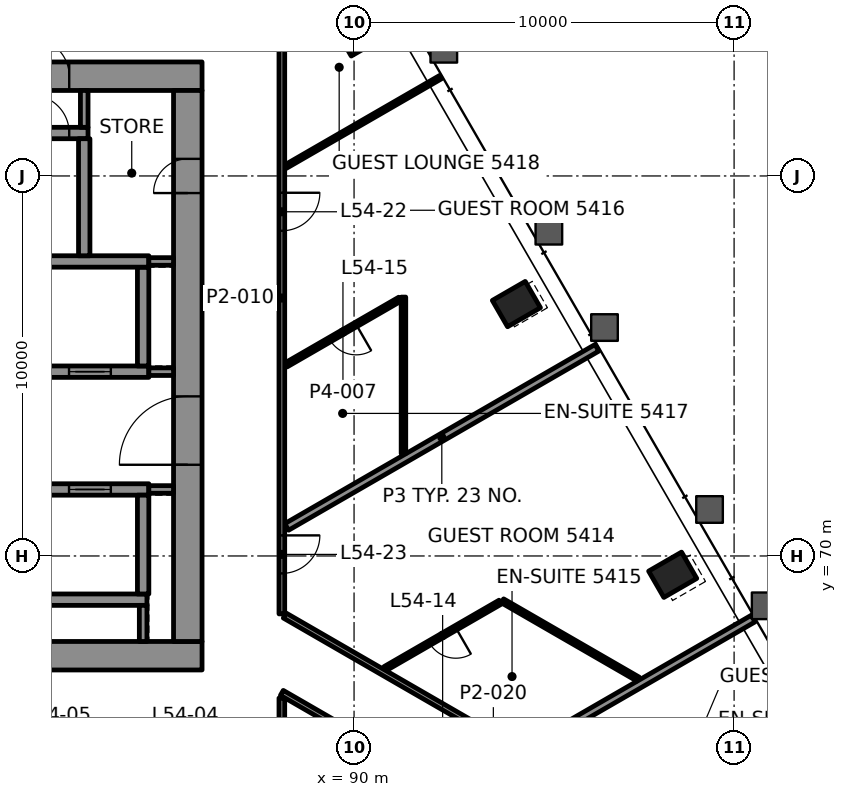
"""IFC4 building model, lengths in metres.
Left out: names, types, materials, properties, quantities, classifications, styles, units other than length and angle.
Written with IfcOpenShell. Run it as: python <this file> out.ifc"""

import sys

from ifc_helpers import new_model, si_unit, direction, frame, frame_2d, origin, origin_2d, place, context, subcontext, project, spatial, rectangle, hollow_rectangle, extrude, element, fill, save


model = new_model("IFC4")
c1 = context("Model", 3, precision=1e-05, world=origin(), true_north=direction((0.0, 1.0)))
c2 = subcontext(c1, "Body", "Model", "MODEL_VIEW")
j1 = project(units=[si_unit("LENGTHUNIT", "METRE"), si_unit("PLANEANGLEUNIT", "RADIAN")], contexts=[c1])
p1 = place(None, origin())
s1 = spatial("IfcSite", under=j1, at=p1, CompositionType="ELEMENT")
p2 = place(p1, origin())
s2 = spatial("IfcBuilding", under=s1, at=p2, CompositionType="ELEMENT")
p3 = place(p2, frame((0.0, 0.0, 229.9)))
s3 = spatial("IfcBuildingStorey", under=s2, at=p3, CompositionType="ELEMENT", Elevation=229.9)
for number, where, z_axis, x_axis in (
    (1, (98.385, 69.505, -0.0), (0.0, 0.0, 1.0), (-0.5, 0.866, 0.0)),
    (2, (94.272, 76.628, -0.0), (0.0, 0.0, 1.0), (-0.5, 0.866, 0.0)),
    (3, (90.159, 83.752, -0.0), (0.0, 0.0, 1.0), (-0.5, 0.866, 0.0)),
):
    element("IfcColumn", number, at=place(p3, frame(where, z_axis=z_axis, x_axis=x_axis)), inside=s3, PredefinedType="COLUMN", context=c2, shape_type="SweptSolid", body=[
        extrude(hollow_rectangle(XDim=0.8, YDim=1.0, WallThickness=0.05, at=origin_2d()), origin(), (0.0, 0.0, 1.0), 3.9),
    ])
p4 = place(p3, frame((64.0, 67.375, 0.0), z_axis=(0.0, 0.0, 1.0), x_axis=(1.0, 0.0, 0.0)))
e4 = element("IfcWall", 4, at=p4, inside=s3, PredefinedType="SHEAR", context=c2, shape_type="SweptSolid", body=[
    extrude(rectangle(XDim=22.0, YDim=0.75, at=frame_2d((11.0, 0.0))), origin(), (0.0, 0.0, 1.0), 3.7),
])
p5 = place(p4, frame((1.575, 0.0, 0.0)))
e5 = element("IfcOpeningElement", 5, at=p5, cuts=e4, PredefinedType="OPENING", context=c2, shape_type="SweptSolid", body=[
    extrude(rectangle(XDim=0.9, YDim=2.1, at=frame_2d((0.45, 1.05))), frame((0.0, 0.385, 0.0), z_axis=(0.0, -1.0, 0.0), x_axis=(1.0, 0.0, 0.0)), (0.0, 0.0, 1.0), 0.77),
])
p6 = place(p4, frame((4.425, 0.0, 0.0)))
e6 = element("IfcOpeningElement", 6, at=p6, cuts=e4, PredefinedType="OPENING", context=c2, shape_type="SweptSolid", body=[
    extrude(rectangle(XDim=0.9, YDim=2.1, at=frame_2d((0.45, 1.05))), frame((0.0, 0.385, 0.0), z_axis=(0.0, -1.0, 0.0), x_axis=(1.0, 0.0, 0.0)), (0.0, 0.0, 1.0), 0.77),
])
p7 = place(p3, frame((64.0, 82.625, 0.0), z_axis=(0.0, 0.0, 1.0), x_axis=(1.0, 0.0, 0.0)))
e7 = element("IfcWall", 7, at=p7, inside=s3, PredefinedType="SHEAR", context=c2, shape_type="SweptSolid", body=[
    extrude(rectangle(XDim=22.0, YDim=0.75, at=frame_2d((11.0, 0.0))), origin(), (0.0, 0.0, 1.0), 3.7),
])
p8 = place(p7, frame((3.695, 0.0, 0.0)))
e8 = element("IfcOpeningElement", 8, at=p8, cuts=e7, PredefinedType="OPENING", context=c2, shape_type="SweptSolid", body=[
    extrude(rectangle(XDim=1.0, YDim=2.1, at=frame_2d((0.5, 1.05))), frame((0.0, 0.385, 0.0), z_axis=(0.0, -1.0, 0.0), x_axis=(1.0, 0.0, 0.0)), (0.0, 0.0, 1.0), 0.77),
])
p9 = place(p7, frame((17.505, 0.0, 0.0)))
e9 = element("IfcOpeningElement", 9, at=p9, cuts=e7, PredefinedType="OPENING", context=c2, shape_type="SweptSolid", body=[
    extrude(rectangle(XDim=1.0, YDim=2.1, at=frame_2d((0.5, 1.05))), frame((0.0, 0.385, 0.0), z_axis=(0.0, -1.0, 0.0), x_axis=(1.0, 0.0, 0.0)), (0.0, 0.0, 1.0), 0.77),
])
p10 = place(p7, frame((10.65, 0.0, 0.0)))
e10 = element("IfcOpeningElement", 10, at=p10, cuts=e7, PredefinedType="OPENING", context=c2, shape_type="SweptSolid", body=[
    extrude(rectangle(XDim=0.9, YDim=2.1, at=frame_2d((0.45, 1.05))), frame((0.0, 0.385, 0.0), z_axis=(0.0, -1.0, 0.0), x_axis=(1.0, 0.0, 0.0)), (0.0, 0.0, 1.0), 0.77),
])
p11 = place(p3, frame((85.625, 67.75, 0.0), z_axis=(0.0, 0.0, 1.0), x_axis=(0.0, 1.0, 0.0)))
e11 = element("IfcWall", 11, at=p11, inside=s3, PredefinedType="SHEAR", context=c2, shape_type="SweptSolid", body=[
    extrude(rectangle(XDim=14.5, YDim=0.75, at=frame_2d((7.25, 0.0))), origin(), (0.0, 0.0, 1.0), 3.7),
])
p12 = place(p11, frame((4.65, 0.0, 0.0)))
e12 = element("IfcOpeningElement", 12, at=p12, cuts=e11, PredefinedType="OPENING", context=c2, shape_type="SweptSolid", body=[
    extrude(rectangle(XDim=1.8, YDim=2.1, at=frame_2d((0.9, 1.05))), frame((0.0, 0.385, 0.0), z_axis=(0.0, -1.0, 0.0), x_axis=(1.0, 0.0, 0.0)), (0.0, 0.0, 1.0), 0.77),
])
p13 = place(p11, frame((11.8, 0.0, 0.0)))
e13 = element("IfcOpeningElement", 13, at=p13, cuts=e11, PredefinedType="OPENING", context=c2, shape_type="SweptSolid", body=[
    extrude(rectangle(XDim=0.9, YDim=2.1, at=frame_2d((0.45, 1.05))), frame((0.0, 0.385, 0.0), z_axis=(0.0, -1.0, 0.0), x_axis=(1.0, 0.0, 0.0)), (0.0, 0.0, 1.0), 0.77),
])
p14 = place(p3, frame((70.35, 68.85, 0.0), z_axis=(0.0, 0.0, 1.0), x_axis=(1.0, 0.0, 0.0)))
e14 = element("IfcWall", 14, at=p14, inside=s3, PredefinedType="SHEAR", context=c2, shape_type="SweptSolid", body=[
    extrude(rectangle(XDim=14.2, YDim=0.3, at=frame_2d((7.1, 0.0))), origin(), (0.0, 0.0, 1.0), 3.7),
])
p15 = place(p3, frame((70.3, 71.75, 0.0), z_axis=(0.0, 0.0, 1.0), x_axis=(1.0, 0.0, 0.0)))
e15 = element("IfcWall", 15, at=p15, inside=s3, PredefinedType="SHEAR", context=c2, shape_type="SweptSolid", body=[
    extrude(rectangle(XDim=14.3, YDim=0.3, at=frame_2d((7.15, 0.0))), origin(), (0.0, 0.0, 1.0), 3.7),
])
p16 = place(p15, frame((1.0, 0.0, 0.0)))
e16 = element("IfcOpeningElement", 16, at=p16, cuts=e15, PredefinedType="OPENING", context=c2, shape_type="SweptSolid", body=[
    extrude(rectangle(XDim=1.1, YDim=2.1, at=frame_2d((0.55, 1.05))), frame((0.0, 0.16, 0.0), z_axis=(0.0, -1.0, 0.0), x_axis=(1.0, 0.0, 0.0)), (0.0, 0.0, 1.0), 0.32),
])
p17 = place(p15, frame((3.8, 0.0, 0.0)))
e17 = element("IfcOpeningElement", 17, at=p17, cuts=e15, PredefinedType="OPENING", context=c2, shape_type="SweptSolid", body=[
    extrude(rectangle(XDim=1.1, YDim=2.1, at=frame_2d((0.55, 1.05))), frame((0.0, 0.16, 0.0), z_axis=(0.0, -1.0, 0.0), x_axis=(1.0, 0.0, 0.0)), (0.0, 0.0, 1.0), 0.32),
])
p18 = place(p15, frame((6.6, 0.0, 0.0)))
e18 = element("IfcOpeningElement", 18, at=p18, cuts=e15, PredefinedType="OPENING", context=c2, shape_type="SweptSolid", body=[
    extrude(rectangle(XDim=1.1, YDim=2.1, at=frame_2d((0.55, 1.05))), frame((0.0, 0.16, 0.0), z_axis=(0.0, -1.0, 0.0), x_axis=(1.0, 0.0, 0.0)), (0.0, 0.0, 1.0), 0.32),
])
p19 = place(p15, frame((9.4, 0.0, 0.0)))
e19 = element("IfcOpeningElement", 19, at=p19, cuts=e15, PredefinedType="OPENING", context=c2, shape_type="SweptSolid", body=[
    extrude(rectangle(XDim=1.1, YDim=2.1, at=frame_2d((0.55, 1.05))), frame((0.0, 0.16, 0.0), z_axis=(0.0, -1.0, 0.0), x_axis=(1.0, 0.0, 0.0)), (0.0, 0.0, 1.0), 0.32),
])
p20 = place(p15, frame((12.2, 0.0, 0.0)))
e20 = element("IfcOpeningElement", 20, at=p20, cuts=e15, PredefinedType="OPENING", context=c2, shape_type="SweptSolid", body=[
    extrude(rectangle(XDim=1.1, YDim=2.1, at=frame_2d((0.55, 1.05))), frame((0.0, 0.16, 0.0), z_axis=(0.0, -1.0, 0.0), x_axis=(1.0, 0.0, 0.0)), (0.0, 0.0, 1.0), 0.32),
])
p21 = place(p3, frame((70.3, 74.85, 0.0), z_axis=(0.0, 0.0, 1.0), x_axis=(1.0, 0.0, 0.0)))
e21 = element("IfcWall", 21, at=p21, inside=s3, PredefinedType="SHEAR", context=c2, shape_type="SweptSolid", body=[
    extrude(rectangle(XDim=14.3, YDim=0.3, at=frame_2d((7.15, 0.0))), origin(), (0.0, 0.0, 1.0), 3.7),
])
p22 = place(p21, frame((3.8, 0.0, 0.0)))
e22 = element("IfcOpeningElement", 22, at=p22, cuts=e21, PredefinedType="OPENING", context=c2, shape_type="SweptSolid", body=[
    extrude(rectangle(XDim=1.1, YDim=2.1, at=frame_2d((0.55, 1.05))), frame((0.0, 0.16, 0.0), z_axis=(0.0, -1.0, 0.0), x_axis=(1.0, 0.0, 0.0)), (0.0, 0.0, 1.0), 0.32),
])
p23 = place(p21, frame((12.2, 0.0, 0.0)))
e23 = element("IfcOpeningElement", 23, at=p23, cuts=e21, PredefinedType="OPENING", context=c2, shape_type="SweptSolid", body=[
    extrude(rectangle(XDim=1.1, YDim=2.1, at=frame_2d((0.55, 1.05))), frame((0.0, 0.16, 0.0), z_axis=(0.0, -1.0, 0.0), x_axis=(1.0, 0.0, 0.0)), (0.0, 0.0, 1.0), 0.32),
])
for number, where, z_axis, x_axis in (
    (24, (84.45, 69.0, 0.0), (0.0, 0.0, 1.0), (0.0, 1.0, 0.0)),
    (25, (84.45, 75.0, 0.0), (0.0, 0.0, 1.0), (0.0, 1.0, 0.0)),
):
    element("IfcWall", number, at=place(p3, frame(where, z_axis=z_axis, x_axis=x_axis)), inside=s3, PredefinedType="SHEAR", context=c2, shape_type="SweptSolid", body=[
        extrude(rectangle(XDim=2.6, YDim=0.3, at=frame_2d((1.3, 0.0))), origin(), (0.0, 0.0, 1.0), 3.7),
    ])
p24 = place(p3, frame((67.15, 77.75, 0.0), z_axis=(0.0, 0.0, 1.0), x_axis=(1.0, 0.0, 0.0)))
e26 = element("IfcWall", 26, at=p24, inside=s3, PredefinedType="SHEAR", context=c2, shape_type="SweptSolid", body=[
    extrude(rectangle(XDim=17.45, YDim=0.3, at=frame_2d((8.725, 0.0))), origin(), (0.0, 0.0, 1.0), 3.7),
])
p25 = place(p24, frame((0.545, 0.0, 0.0)))
e27 = element("IfcOpeningElement", 27, at=p25, cuts=e26, PredefinedType="OPENING", context=c2, shape_type="SweptSolid", body=[
    extrude(rectangle(XDim=1.0, YDim=2.1, at=frame_2d((0.5, 1.05))), frame((0.0, 0.16, 0.0), z_axis=(0.0, -1.0, 0.0), x_axis=(1.0, 0.0, 0.0)), (0.0, 0.0, 1.0), 0.32),
])
p26 = place(p3, frame((76.14, 81.13, 0.0), z_axis=(0.0, 0.0, 1.0), x_axis=(1.0, 0.0, 0.0)))
e28 = element("IfcWall", 28, at=p26, inside=s3, PredefinedType="SHEAR", context=c2, shape_type="SweptSolid", body=[
    extrude(rectangle(XDim=6.86, YDim=0.3, at=frame_2d((3.43, 0.0))), origin(), (0.0, 0.0, 1.0), 3.7),
])
p27 = place(p26, frame((5.365, 0.0, 0.0)))
e29 = element("IfcOpeningElement", 29, at=p27, cuts=e28, PredefinedType="OPENING", context=c2, shape_type="SweptSolid", body=[
    extrude(rectangle(XDim=1.0, YDim=2.1, at=frame_2d((0.5, 1.05))), frame((0.0, 0.16, 0.0), z_axis=(0.0, -1.0, 0.0), x_axis=(1.0, 0.0, 0.0)), (0.0, 0.0, 1.0), 0.32),
])
p28 = place(p3, frame((82.9, 77.9, 0.0), z_axis=(0.0, 0.0, 1.0), x_axis=(0.0, 1.0, 0.0)))
e30 = element("IfcWall", 30, at=p28, inside=s3, PredefinedType="SHEAR", context=c2, shape_type="SweptSolid", body=[
    extrude(rectangle(XDim=3.08, YDim=0.3, at=frame_2d((1.54, 0.0))), origin(), (0.0, 0.0, 1.0), 3.7),
])
p29 = place(p3, frame((94.535, 64.907, 0.0), z_axis=(0.0, 0.0, 1.0), x_axis=(0.866022205013, 0.500005540394, 0.0)))
e31 = element("IfcWall", 31, at=p29, inside=s3, PredefinedType="PARTITIONING", context=c2, shape_type="SweptSolid", body=[
    extrude(rectangle(XDim=6.893, YDim=0.2, at=frame_2d((3.447, 0.0))), origin(), (0.0, 0.0, 1.0), 3.1),
])
p30 = place(p3, frame((93.846, 68.784, 0.0), z_axis=(0.0, 0.0, 1.0), x_axis=(-0.865997352085, -0.500048583822, 0.0)))
e32 = element("IfcWall", 32, at=p30, inside=s3, PredefinedType="PARTITIONING", context=c2, shape_type="SweptSolid", body=[
    extrude(rectangle(XDim=3.499, YDim=0.12, at=frame_2d((1.75, 0.0))), origin(), (0.0, 0.0, 1.0), 3.1),
])
p31 = place(p30, frame((1.35, 0.0, 0.0)))
e33 = element("IfcOpeningElement", 33, at=p31, cuts=e32, PredefinedType="OPENING", context=c2, shape_type="SweptSolid", body=[
    extrude(rectangle(XDim=0.8, YDim=2.1, at=frame_2d((0.4, 1.05))), frame((0.0, 0.07, 0.0), z_axis=(0.0, -1.0, 0.0), x_axis=(1.0, 0.0, 0.0)), (0.0, 0.0, 1.0), 0.14),
])
p32 = place(p3, frame((88.227, 70.764, 0.0), z_axis=(0.0, 0.0, 1.0), x_axis=(0.866032053748, 0.499988481748, 0.0)))
e34 = element("IfcWall", 34, at=p32, inside=s3, PredefinedType="PARTITIONING", context=c2, shape_type="SweptSolid", body=[
    extrude(rectangle(XDim=9.427, YDim=0.2, at=frame_2d((4.713, 0.0))), origin(), (0.0, 0.0, 1.0), 3.022),
])
p33 = place(p3, frame((91.206, 76.757, 0.0), z_axis=(0.0, 0.0, 1.0), x_axis=(-0.866028087245, -0.499995352082, 0.0)))
e35 = element("IfcWall", 35, at=p33, inside=s3, PredefinedType="PARTITIONING", context=c2, shape_type="SweptSolid", body=[
    extrude(rectangle(XDim=3.459, YDim=0.12, at=frame_2d((1.729, 0.0))), origin(), (0.0, 0.0, 1.0), 3.1),
])
p34 = place(p33, frame((1.33, 0.0, 0.0)))
e36 = element("IfcOpeningElement", 36, at=p34, cuts=e35, PredefinedType="OPENING", context=c2, shape_type="SweptSolid", body=[
    extrude(rectangle(XDim=0.8, YDim=2.1, at=frame_2d((0.4, 1.05))), frame((0.0, 0.07, 0.0), z_axis=(0.0, -1.0, 0.0), x_axis=(1.0, 0.0, 0.0)), (0.0, 0.0, 1.0), 0.14),
])
p35 = place(p3, frame((88.201, 80.248, 0.0), z_axis=(0.0, 0.0, 1.0), x_axis=(0.866032742664, 0.499987288472, 0.0)))
e37 = element("IfcWall", 37, at=p35, inside=s3, PredefinedType="PARTITIONING", context=c2, shape_type="SweptSolid", body=[
    extrude(rectangle(XDim=4.708, YDim=0.1, at=frame_2d((2.354, 0.0))), origin(), (0.0, 0.0, 1.0), 3.022),
])
p36 = place(p3, frame((91.3, 72.694, 0.0), z_axis=(0.0, 0.0, 1.0), x_axis=(0.0, 1.0, 0.0)))
e38 = element("IfcWall", 38, at=p36, inside=s3, PredefinedType="PARTITIONING", context=c2, shape_type="SweptSolid", body=[
    extrude(rectangle(XDim=4.118, YDim=0.12, at=frame_2d((2.059, 0.0))), origin(), (0.0, 0.0, 1.0), 3.1),
])
p37 = place(p3, frame((88.1, 64.976, 0.0), z_axis=(0.0, 0.0, 1.0), x_axis=(0.0, 1.0, 0.0)))
e39 = element("IfcWall", 39, at=p37, inside=s3, PredefinedType="PARTITIONING", context=c2, shape_type="SweptSolid", body=[
    extrude(rectangle(XDim=1.285, YDim=0.15, at=frame_2d((0.643, 0.0))), origin(), (0.0, 0.0, 1.0), 2.947),
])
p38 = place(p3, frame((88.1, 85.1, 0.0), z_axis=(0.0, 0.0, 1.0), x_axis=(0.0, -1.0, 0.0)))
e40 = element("IfcWall", 40, at=p38, inside=s3, PredefinedType="PARTITIONING", context=c2, shape_type="SweptSolid", body=[
    extrude(rectangle(XDim=16.624, YDim=0.15, at=frame_2d((8.312, 0.0))), origin(), (0.0, 0.0, 1.0), 3.1),
])
p39 = place(p38, frame((5.542, 0.0, 0.0)))
e41 = element("IfcOpeningElement", 41, at=p39, cuts=e40, PredefinedType="OPENING", context=c2, shape_type="SweptSolid", body=[
    extrude(rectangle(XDim=1.0, YDim=2.1, at=frame_2d((0.5, 1.05))), frame((0.0, 0.085, 0.0), z_axis=(0.0, -1.0, 0.0), x_axis=(1.0, 0.0, 0.0)), (0.0, 0.0, 1.0), 0.17),
])
p40 = place(p38, frame((14.558, 0.0, 0.0)))
e42 = element("IfcOpeningElement", 42, at=p40, cuts=e40, PredefinedType="OPENING", context=c2, shape_type="SweptSolid", body=[
    extrude(rectangle(XDim=1.0, YDim=2.1, at=frame_2d((0.5, 1.05))), frame((0.0, 0.085, 0.0), z_axis=(0.0, -1.0, 0.0), x_axis=(1.0, 0.0, 0.0)), (0.0, 0.0, 1.0), 0.17),
])
p41 = place(p3, frame((97.473, 66.76, 0.0), z_axis=(0.0, 0.0, 1.0), x_axis=(-0.866027647951, 0.499996112969, 0.0)))
e43 = element("IfcWall", 43, at=p41, inside=s3, PredefinedType="PARTITIONING", context=c2, shape_type="SweptSolid", body=[
    extrude(rectangle(XDim=4.119, YDim=0.12, at=frame_2d((2.059, 0.0))), origin(), (0.0, 0.0, 1.0), 3.1),
])
p42 = place(p3, frame((88.175, 68.433, 0.0), z_axis=(0.0, 0.0, 1.0), x_axis=(0.866028141608, -0.499995257921, 0.0)))
e44 = element("IfcWall", 44, at=p42, inside=s3, PredefinedType="PARTITIONING", context=c2, shape_type="SweptSolid", body=[
    extrude(rectangle(XDim=12.679, YDim=0.15, at=frame_2d((6.339, 0.0))), origin(), (0.0, 0.0, 1.0), 3.1),
])
p43 = place(p42, frame((7.779, 0.0, 0.0)))
e45 = element("IfcOpeningElement", 45, at=p43, cuts=e44, PredefinedType="OPENING", context=c2, shape_type="SweptSolid", body=[
    extrude(rectangle(XDim=1.0, YDim=2.1, at=frame_2d((0.5, 1.05))), frame((0.0, 0.085, 0.0), z_axis=(0.0, -1.0, 0.0), x_axis=(1.0, 0.0, 0.0)), (0.0, 0.0, 1.0), 0.17),
])
p44 = place(p3, frame((98.255, 60.535, 0.0), z_axis=(0.0, 0.0, 1.0), x_axis=(-0.866028172479, 0.49999520445, 0.0)))
e46 = element("IfcWall", 46, at=p44, inside=s3, PredefinedType="PARTITIONING", context=c2, shape_type="SweptSolid", body=[
    extrude(rectangle(XDim=11.726, YDim=0.15, at=frame_2d((5.863, 0.0))), origin(), (0.0, 0.0, 1.0), 2.947),
])
for number, where, z_axis, x_axis in (
    (47, (84.6, 71.75, 0.0), (0.0, 0.0, 1.0), (1.0, 0.0, 0.0)),
    (48, (84.6, 74.85, 0.0), (0.0, 0.0, 1.0), (1.0, 0.0, 0.0)),
    (49, (84.6, 77.75, 0.0), (0.0, 0.0, 1.0), (1.0, 0.0, 0.0)),
):
    element("IfcWall", number, at=place(p3, frame(where, z_axis=z_axis, x_axis=x_axis)), inside=s3, PredefinedType="PARTITIONING", context=c2, shape_type="SweptSolid", body=[
        extrude(rectangle(XDim=0.65, YDim=0.2, at=frame_2d((0.325, 0.0))), origin(), (0.0, 0.0, 1.0), 3.7),
    ])
p45 = place(p3, frame((82.9, 81.28, 0.0), z_axis=(0.0, 0.0, 1.0), x_axis=(0.0, 1.0, 0.0)))
e50 = element("IfcWall", 50, at=p45, inside=s3, PredefinedType="PARTITIONING", context=c2, shape_type="SweptSolid", body=[
    extrude(rectangle(XDim=0.97, YDim=0.2, at=frame_2d((0.485, 0.0))), origin(), (0.0, 0.0, 1.0), 3.7),
])
p46 = place(p3, frame((84.45, 67.75, 0.0), z_axis=(0.0, 0.0, 1.0), x_axis=(0.0, 1.0, 0.0)))
e51 = element("IfcWall", 51, at=p46, inside=s3, PredefinedType="PARTITIONING", context=c2, shape_type="SweptSolid", body=[
    extrude(rectangle(XDim=0.95, YDim=0.2, at=frame_2d((0.475, 0.0))), origin(), (0.0, 0.0, 1.0), 3.7),
])
p47 = place(p31, origin())
e52 = element("IfcDoor", 52, at=p47, inside=s3, OperationType="SINGLE_SWING_LEFT", PredefinedType="DOOR", context=c2, shape_type="SweptSolid", body=[
    extrude(rectangle(XDim=0.8, YDim=2.1, at=frame_2d((0.4, 1.05))), frame((0.0, 0.025, 0.0), z_axis=(0.0, -1.0, 0.0), x_axis=(1.0, 0.0, 0.0)), (0.0, 0.0, 1.0), 0.05),
])
fill(e33, e52)
p48 = place(p34, origin())
e53 = element("IfcDoor", 53, at=p48, inside=s3, OperationType="SINGLE_SWING_LEFT", PredefinedType="DOOR", context=c2, shape_type="SweptSolid", body=[
    extrude(rectangle(XDim=0.8, YDim=2.1, at=frame_2d((0.4, 1.05))), frame((0.0, 0.025, 0.0), z_axis=(0.0, -1.0, 0.0), x_axis=(1.0, 0.0, 0.0)), (0.0, 0.0, 1.0), 0.05),
])
fill(e36, e53)
p49 = place(p39, origin())
e54 = element("IfcDoor", 54, at=p49, inside=s3, OperationType="SINGLE_SWING_RIGHT", PredefinedType="DOOR", context=c2, shape_type="SweptSolid", body=[
    extrude(rectangle(XDim=1.0, YDim=2.1, at=frame_2d((0.5, 1.05))), frame((0.0, 0.025, 0.0), z_axis=(0.0, -1.0, 0.0), x_axis=(1.0, 0.0, 0.0)), (0.0, 0.0, 1.0), 0.05),
])
fill(e41, e54)
p50 = place(p40, origin())
e55 = element("IfcDoor", 55, at=p50, inside=s3, OperationType="SINGLE_SWING_RIGHT", PredefinedType="DOOR", context=c2, shape_type="SweptSolid", body=[
    extrude(rectangle(XDim=1.0, YDim=2.1, at=frame_2d((0.5, 1.05))), frame((0.0, 0.025, 0.0), z_axis=(0.0, -1.0, 0.0), x_axis=(1.0, 0.0, 0.0)), (0.0, 0.0, 1.0), 0.05),
])
fill(e42, e55)
p51 = place(p20, origin())
e56 = element("IfcDoor", 56, at=p51, inside=s3, OperationType="DOUBLE_DOOR_SLIDING", PredefinedType="DOOR", context=c2, shape_type="SweptSolid", body=[
    extrude(rectangle(XDim=1.1, YDim=2.1, at=frame_2d((0.55, 1.05))), frame((0.0, 0.025, 0.0), z_axis=(0.0, -1.0, 0.0), x_axis=(1.0, 0.0, 0.0)), (0.0, 0.0, 1.0), 0.05),
])
fill(e20, e56)
p52 = place(p23, origin())
e57 = element("IfcDoor", 57, at=p52, inside=s3, OperationType="DOUBLE_DOOR_SLIDING", PredefinedType="DOOR", context=c2, shape_type="SweptSolid", body=[
    extrude(rectangle(XDim=1.1, YDim=2.1, at=frame_2d((0.55, 1.05))), frame((0.0, 0.025, 0.0), z_axis=(0.0, -1.0, 0.0), x_axis=(1.0, 0.0, 0.0)), (0.0, 0.0, 1.0), 0.05),
])
fill(e23, e57)
p53 = place(p27, origin())
e58 = element("IfcDoor", 58, at=p53, inside=s3, OperationType="SINGLE_SWING_RIGHT", PredefinedType="DOOR", context=c2, shape_type="SweptSolid", body=[
    extrude(rectangle(XDim=1.0, YDim=2.1, at=frame_2d((0.5, 1.05))), frame((0.0, 0.025, 0.0), z_axis=(0.0, -1.0, 0.0), x_axis=(1.0, 0.0, 0.0)), (0.0, 0.0, 1.0), 0.05),
])
fill(e29, e58)
p54 = place(p9, origin())
e59 = element("IfcDoor", 59, at=p54, inside=s3, OperationType="SINGLE_SWING_LEFT", PredefinedType="DOOR", context=c2, shape_type="SweptSolid", body=[
    extrude(rectangle(XDim=1.0, YDim=2.1, at=frame_2d((0.5, 1.05))), frame((0.0, 0.095, 0.0), z_axis=(0.0, -1.0, 0.0), x_axis=(1.0, 0.0, 0.0)), (0.0, 0.0, 1.0), 0.19),
])
fill(e9, e59)
p55 = place(p12, origin())
e60 = element("IfcDoor", 60, at=p55, inside=s3, OperationType="SINGLE_SWING_RIGHT", PredefinedType="DOOR", context=c2, shape_type="SweptSolid", body=[
    extrude(rectangle(XDim=1.8, YDim=2.1, at=frame_2d((0.9, 1.05))), frame((0.0, 0.095, 0.0), z_axis=(0.0, -1.0, 0.0), x_axis=(1.0, 0.0, 0.0)), (0.0, 0.0, 1.0), 0.19),
])
fill(e12, e60)
p56 = place(p13, origin())
e61 = element("IfcDoor", 61, at=p56, inside=s3, OperationType="SINGLE_SWING_RIGHT", PredefinedType="DOOR", context=c2, shape_type="SweptSolid", body=[
    extrude(rectangle(XDim=0.9, YDim=2.1, at=frame_2d((0.45, 1.05))), frame((0.0, 0.095, 0.0), z_axis=(0.0, -1.0, 0.0), x_axis=(1.0, 0.0, 0.0)), (0.0, 0.0, 1.0), 0.19),
])
fill(e13, e61)
save(model, sys.argv[1])
